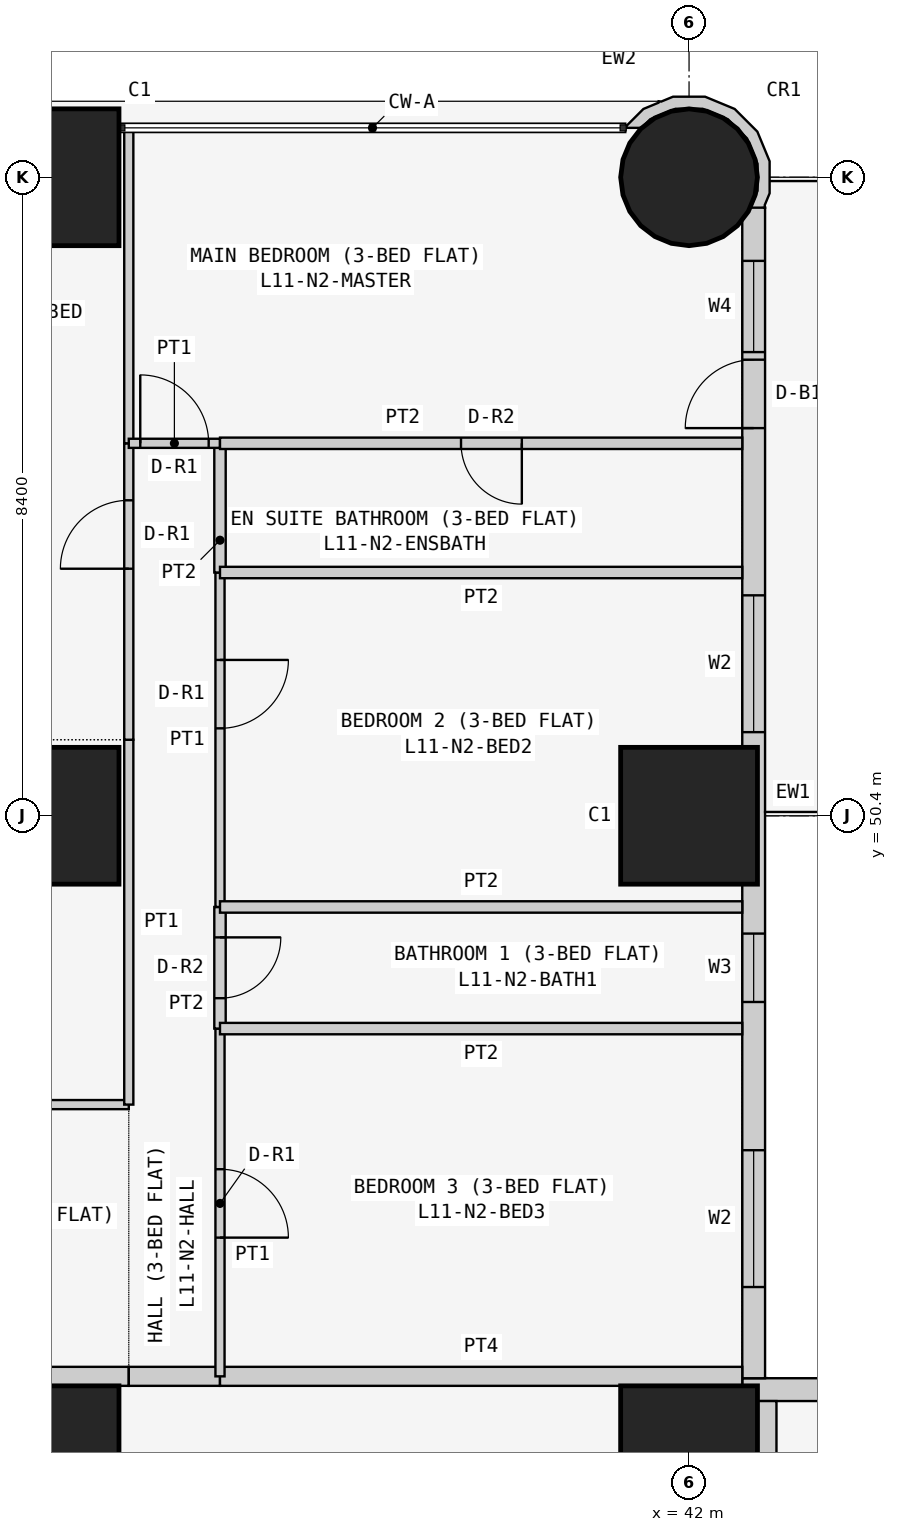
"""IFC4 building model, lengths in metres.
Left out: names, types, materials, properties, quantities, classifications, styles, units other than length and angle.
Written with IfcOpenShell. Run it as: python <this file> out.ifc"""

import sys

from ifc_helpers import new_model, si_unit, direction, frame, frame_2d, origin, origin_2d, place, context, subcontext, project, spatial, polyline, rectangle, circle, outline, extrude, element, fill, save


model = new_model("IFC4")
c1 = context("Model", 3, precision=1e-05, world=origin(), true_north=direction((0.0, 1.0)))
c2 = subcontext(c1, "Body", "Model", "MODEL_VIEW")
j1 = project(units=[si_unit("LENGTHUNIT", "METRE"), si_unit("PLANEANGLEUNIT", "RADIAN")], contexts=[c1])
p1 = place(None, origin())
s1 = spatial("IfcSite", under=j1, at=p1, CompositionType="ELEMENT")
p2 = place(p1, origin())
s2 = spatial("IfcBuilding", under=s1, at=p2, CompositionType="ELEMENT")
p3 = place(p2, frame((0.0, 0.0, 48.9)))
s3 = spatial("IfcBuildingStorey", under=s2, at=p3, CompositionType="ELEMENT", Elevation=48.9)
for number, where, z_axis, x_axis in (
    (1, (33.6, 42.0, 0.0), (0.0, 0.0, 1.0), (1.0, 0.0, 0.0)),
    (2, (33.6, 50.4, 0.0), (0.0, 0.0, 1.0), (1.0, 0.0, 0.0)),
    (3, (33.6, 58.8, 0.0), (0.0, 0.0, 1.0), (1.0, 0.0, 0.0)),
    (4, (42.0, 42.0, 0.0), (0.0, 0.0, 1.0), (1.0, 0.0, 0.0)),
    (5, (42.0, 50.4, 0.0), (0.0, 0.0, 1.0), (1.0, 0.0, 0.0)),
):
    element("IfcColumn", number, at=place(p3, frame(where, z_axis=z_axis, x_axis=x_axis)), inside=s3, PredefinedType="COLUMN", context=c2, shape_type="SweptSolid", body=[
        extrude(rectangle(XDim=1.8, YDim=1.8, at=origin_2d()), origin(), (0.0, 0.0, 1.0), 3.6),
    ])
p4 = place(p3, frame((42.0, 58.8, 0.0), z_axis=(0.0, 0.0, 1.0), x_axis=(1.0, 0.0, 0.0)))
e6 = element("IfcColumn", 6, at=p4, inside=s3, PredefinedType="COLUMN", context=c2, shape_type="SweptSolid", body=[
    extrude(circle(Radius=0.9, at=origin_2d()), origin(), (0.0, 0.0, 1.0), 3.6),
])
p5 = place(p3, frame((58.4, 42.85, 0.0), z_axis=(0.0, 0.0, 1.0), x_axis=(-1.0, 0.0, 0.0)))
e7 = element("IfcWall", 7, at=p5, inside=s3, PredefinedType="SOLIDWALL", context=c2, shape_type="SweptSolid", body=[
    extrude(rectangle(XDim=15.7, YDim=0.3, at=frame_2d((7.85, 0.0))), origin(), (0.0, 0.0, 1.0), 3.45),
])
p6 = place(p5, frame((12.4, 0.0, 0.9)))
e8 = element("IfcOpeningElement", 8, at=p6, cuts=e7, PredefinedType="OPENING", context=c2, shape_type="SweptSolid", body=[
    extrude(rectangle(XDim=1.8, YDim=1.5, at=frame_2d((0.9, 0.75))), frame((0.0, 0.16, 0.0), z_axis=(0.0, -1.0, 0.0), x_axis=(1.0, 0.0, 0.0)), (0.0, 0.0, 1.0), 0.32),
])
p7 = place(p5, frame((9.55, 0.0, 1.5)))
e9 = element("IfcOpeningElement", 9, at=p7, cuts=e7, PredefinedType="OPENING", context=c2, shape_type="SweptSolid", body=[
    extrude(rectangle(XDim=0.9, YDim=0.7, at=frame_2d((0.45, 0.35))), frame((0.0, 0.16, 0.0), z_axis=(0.0, -1.0, 0.0), x_axis=(1.0, 0.0, 0.0)), (0.0, 0.0, 1.0), 0.32),
])
p8 = place(p5, frame((5.1, 0.0, 0.9)))
e10 = element("IfcOpeningElement", 10, at=p8, cuts=e7, PredefinedType="OPENING", context=c2, shape_type="SweptSolid", body=[
    extrude(rectangle(XDim=1.8, YDim=1.5, at=frame_2d((0.9, 0.75))), frame((0.0, 0.16, 0.0), z_axis=(0.0, -1.0, 0.0), x_axis=(1.0, 0.0, 0.0)), (0.0, 0.0, 1.0), 0.32),
])
p9 = place(p5, frame((2.0, 0.0, 0.0)))
e11 = element("IfcOpeningElement", 11, at=p9, cuts=e7, PredefinedType="OPENING", context=c2, shape_type="SweptSolid", body=[
    extrude(rectangle(XDim=0.9, YDim=2.4, at=frame_2d((0.45, 1.2))), frame((0.0, 0.16, 0.0), z_axis=(0.0, -1.0, 0.0), x_axis=(1.0, 0.0, 0.0)), (0.0, 0.0, 1.0), 0.32),
])
p10 = place(p5, frame((0.7, 0.0, 0.9)))
e12 = element("IfcOpeningElement", 12, at=p10, cuts=e7, PredefinedType="OPENING", context=c2, shape_type="SweptSolid", body=[
    extrude(rectangle(XDim=1.2, YDim=1.5, at=frame_2d((0.6, 0.75))), frame((0.0, 0.16, 0.0), z_axis=(0.0, -1.0, 0.0), x_axis=(1.0, 0.0, 0.0)), (0.0, 0.0, 1.0), 0.32),
])
p11 = place(p3, frame((42.85, 43.0, 0.0), z_axis=(0.0, 0.0, 1.0), x_axis=(0.0, 1.0, 0.0)))
e13 = element("IfcWall", 13, at=p11, inside=s3, PredefinedType="SOLIDWALL", context=c2, shape_type="SweptSolid", body=[
    extrude(rectangle(XDim=15.4, YDim=0.3, at=frame_2d((7.7, 0.0))), origin(), (0.0, 0.0, 1.0), 3.45),
])
p12 = place(p11, frame((1.2, 0.0, 0.9)))
e14 = element("IfcOpeningElement", 14, at=p12, cuts=e13, PredefinedType="OPENING", context=c2, shape_type="SweptSolid", body=[
    extrude(rectangle(XDim=1.8, YDim=1.5, at=frame_2d((0.9, 0.75))), frame((0.0, 0.16, 0.0), z_axis=(0.0, -1.0, 0.0), x_axis=(1.0, 0.0, 0.0)), (0.0, 0.0, 1.0), 0.32),
])
p13 = place(p11, frame((4.95, 0.0, 1.5)))
e15 = element("IfcOpeningElement", 15, at=p13, cuts=e13, PredefinedType="OPENING", context=c2, shape_type="SweptSolid", body=[
    extrude(rectangle(XDim=0.9, YDim=0.7, at=frame_2d((0.45, 0.35))), frame((0.0, 0.16, 0.0), z_axis=(0.0, -1.0, 0.0), x_axis=(1.0, 0.0, 0.0)), (0.0, 0.0, 1.0), 0.32),
])
p14 = place(p11, frame((8.5, 0.0, 0.9)))
e16 = element("IfcOpeningElement", 16, at=p14, cuts=e13, PredefinedType="OPENING", context=c2, shape_type="SweptSolid", body=[
    extrude(rectangle(XDim=1.8, YDim=1.5, at=frame_2d((0.9, 0.75))), frame((0.0, 0.16, 0.0), z_axis=(0.0, -1.0, 0.0), x_axis=(1.0, 0.0, 0.0)), (0.0, 0.0, 1.0), 0.32),
])
p15 = place(p11, frame((12.5, 0.0, 0.0)))
e17 = element("IfcOpeningElement", 17, at=p15, cuts=e13, PredefinedType="OPENING", context=c2, shape_type="SweptSolid", body=[
    extrude(rectangle(XDim=0.9, YDim=2.4, at=frame_2d((0.45, 1.2))), frame((0.0, 0.16, 0.0), z_axis=(0.0, -1.0, 0.0), x_axis=(1.0, 0.0, 0.0)), (0.0, 0.0, 1.0), 0.32),
])
p16 = place(p11, frame((13.5, 0.0, 0.9)))
e18 = element("IfcOpeningElement", 18, at=p16, cuts=e13, PredefinedType="OPENING", context=c2, shape_type="SweptSolid", body=[
    extrude(rectangle(XDim=1.2, YDim=1.5, at=frame_2d((0.6, 0.75))), frame((0.0, 0.16, 0.0), z_axis=(0.0, -1.0, 0.0), x_axis=(1.0, 0.0, 0.0)), (0.0, 0.0, 1.0), 0.32),
])
p17 = place(p3, frame((42.91, 58.436, 0.0), z_axis=(0.0, 0.0, 1.0), x_axis=(0.377204953059, 0.926129809145, 0.0)))
e19 = element("IfcWall", 19, at=p17, inside=s3, PredefinedType="SOLIDWALL", context=c2, shape_type="SweptSolid", body=[
    extrude(outline(polyline([(0.769, 1.728), (0.75, 1.723), (0.6, 1.875), (0.295, 2.004), (0.281, 1.998), (0.36, 1.803), (0.509, 1.741), (0.761, 1.486), (0.896, 1.154), (0.894, 0.795), (0.755, 0.465), (0.5, 0.213), (0.168, 0.078), (-0.1, 0.08), (0.001, -0.097), (0.03, -0.08), (0.198, -0.081), (0.589, 0.078), (0.889, 0.374), (1.052, 0.763), (1.055, 1.185), (0.896, 1.575), (0.778, 1.695), (0.769, 1.728)])), origin(), (0.0, 0.0, 1.0), 3.45),
])
p18 = place(p3, frame((29.4, 43.025, 0.0), z_axis=(0.0, 0.0, 1.0), x_axis=(1.0, 0.0, 0.0)))
e20 = element("IfcWall", 20, at=p18, inside=s3, PredefinedType="PARTITIONING", context=c2, shape_type="SweptSolid", body=[
    extrude(rectangle(XDim=5.229, YDim=0.25, at=frame_2d((2.615, 0.0))), origin(), (0.0, 0.0, 1.0), 3.45),
])
p19 = place(p18, frame((2.1, 0.0, 0.0)))
e21 = element("IfcOpeningElement", 21, at=p19, cuts=e20, PredefinedType="OPENING", context=c2, shape_type="SweptSolid", body=[
    extrude(rectangle(XDim=1.0, YDim=2.1, at=frame_2d((0.5, 1.05))), frame((0.0, 0.135, 0.0), z_axis=(0.0, -1.0, 0.0), x_axis=(1.0, 0.0, 0.0)), (0.0, 0.0, 1.0), 0.27),
])
p20 = place(p3, frame((34.629, 43.025, 0.0), z_axis=(0.0, 0.0, 1.0), x_axis=(1.0, 0.0, 0.0)))
e22 = element("IfcWall", 22, at=p20, inside=s3, PredefinedType="PARTITIONING", context=c2, shape_type="SweptSolid", body=[
    extrude(rectangle(XDim=1.2, YDim=0.25, at=frame_2d((0.6, 0.0))), origin(), (0.0, 0.0, 1.0), 3.45),
])
for number, where, z_axis, x_axis in (
    (23, (35.829, 43.025, 0.0), (0.0, 0.0, 1.0), (1.0, 0.0, 0.0)),
    (24, (43.025, 42.7, 0.0), (0.0, 0.0, 1.0), (0.0, -1.0, 0.0)),
):
    element("IfcWall", number, at=place(p3, frame(where, z_axis=z_axis, x_axis=x_axis)), inside=s3, PredefinedType="PARTITIONING", context=c2, shape_type="SweptSolid", body=[
        extrude(rectangle(XDim=6.871, YDim=0.25, at=frame_2d((3.436, 0.0))), origin(), (0.0, 0.0, 1.0), 3.45),
    ])
p21 = place(p3, frame((29.4, 46.6, 0.0), z_axis=(0.0, 0.0, 1.0), x_axis=(1.0, 0.0, 0.0)))
e25 = element("IfcWall", 25, at=p21, inside=s3, PredefinedType="PARTITIONING", context=c2, shape_type="SweptSolid", body=[
    extrude(rectangle(XDim=5.229, YDim=0.12, at=frame_2d((2.615, 0.0))), origin(), (0.0, 0.0, 1.0), 3.45),
])
p22 = place(p21, frame((1.05, 0.0, 0.0)))
e26 = element("IfcOpeningElement", 26, at=p22, cuts=e25, PredefinedType="OPENING", context=c2, shape_type="SweptSolid", body=[
    extrude(rectangle(XDim=0.9, YDim=2.1, at=frame_2d((0.45, 1.05))), frame((0.0, 0.07, 0.0), z_axis=(0.0, -1.0, 0.0), x_axis=(1.0, 0.0, 0.0)), (0.0, 0.0, 1.0), 0.14),
])
p23 = place(p3, frame((34.629, 51.4, 0.0), z_axis=(0.0, 0.0, 1.0), x_axis=(0.0, -1.0, 0.0)))
e27 = element("IfcWall", 27, at=p23, inside=s3, PredefinedType="PARTITIONING", context=c2, shape_type="SweptSolid", body=[
    extrude(rectangle(XDim=4.8, YDim=0.12, at=frame_2d((2.4, 0.0))), origin(), (0.0, 0.0, 1.0), 3.45),
])
p24 = place(p3, frame((34.629, 55.3, 0.0), z_axis=(0.0, 0.0, 1.0), x_axis=(0.0, -1.0, 0.0)))
e28 = element("IfcWall", 28, at=p24, inside=s3, PredefinedType="PARTITIONING", context=c2, shape_type="SweptSolid", body=[
    extrude(rectangle(XDim=3.9, YDim=0.12, at=frame_2d((1.95, 0.0))), origin(), (0.0, 0.0, 1.0), 3.45),
])
p25 = place(p24, frame((0.75, 0.0, 0.0)))
e29 = element("IfcOpeningElement", 29, at=p25, cuts=e28, PredefinedType="OPENING", context=c2, shape_type="SweptSolid", body=[
    extrude(rectangle(XDim=0.9, YDim=2.1, at=frame_2d((0.45, 1.05))), frame((0.0, 0.07, 0.0), z_axis=(0.0, -1.0, 0.0), x_axis=(1.0, 0.0, 0.0)), (0.0, 0.0, 1.0), 0.14),
])
p26 = place(p3, frame((34.629, 59.45, 0.0), z_axis=(0.0, 0.0, 1.0), x_axis=(0.0, -1.0, 0.0)))
e30 = element("IfcWall", 30, at=p26, inside=s3, PredefinedType="PARTITIONING", context=c2, shape_type="SweptSolid", body=[
    extrude(rectangle(XDim=4.15, YDim=0.12, at=frame_2d((2.075, 0.0))), origin(), (0.0, 0.0, 1.0), 3.45),
])
p27 = place(p3, frame((35.829, 47.6, 0.0), z_axis=(0.0, 0.0, 1.0), x_axis=(0.0, -1.0, 0.0)))
e31 = element("IfcWall", 31, at=p27, inside=s3, PredefinedType="PARTITIONING", context=c2, shape_type="SweptSolid", body=[
    extrude(rectangle(XDim=4.575, YDim=0.12, at=frame_2d((2.288, 0.0))), origin(), (0.0, 0.0, 1.0), 3.45),
])
p28 = place(p27, frame((1.85, 0.0, 0.0)))
e32 = element("IfcOpeningElement", 32, at=p28, cuts=e31, PredefinedType="OPENING", context=c2, shape_type="SweptSolid", body=[
    extrude(rectangle(XDim=0.9, YDim=2.1, at=frame_2d((0.45, 1.05))), frame((0.0, 0.07, 0.0), z_axis=(0.0, -1.0, 0.0), x_axis=(1.0, 0.0, 0.0)), (0.0, 0.0, 1.0), 0.14),
])
p29 = place(p3, frame((35.829, 49.2, 0.0), z_axis=(0.0, 0.0, 1.0), x_axis=(0.0, -1.0, 0.0)))
e33 = element("IfcWall", 33, at=p29, inside=s3, PredefinedType="PARTITIONING", context=c2, shape_type="SweptSolid", body=[
    extrude(rectangle(XDim=1.6, YDim=0.15, at=frame_2d((0.8, 0.0))), origin(), (0.0, 0.0, 1.0), 3.45),
])
p30 = place(p29, frame((0.4, 0.0, 0.0)))
e34 = element("IfcOpeningElement", 34, at=p30, cuts=e33, PredefinedType="OPENING", context=c2, shape_type="SweptSolid", body=[
    extrude(rectangle(XDim=0.8, YDim=2.1, at=frame_2d((0.4, 1.05))), frame((0.0, 0.085, 0.0), z_axis=(0.0, -1.0, 0.0), x_axis=(1.0, 0.0, 0.0)), (0.0, 0.0, 1.0), 0.17),
])
p31 = place(p3, frame((35.829, 53.6, 0.0), z_axis=(0.0, 0.0, 1.0), x_axis=(0.0, -1.0, 0.0)))
e35 = element("IfcWall", 35, at=p31, inside=s3, PredefinedType="PARTITIONING", context=c2, shape_type="SweptSolid", body=[
    extrude(rectangle(XDim=4.4, YDim=0.12, at=frame_2d((2.2, 0.0))), origin(), (0.0, 0.0, 1.0), 3.45),
])
p32 = place(p31, frame((1.15, 0.0, 0.0)))
e36 = element("IfcOpeningElement", 36, at=p32, cuts=e35, PredefinedType="OPENING", context=c2, shape_type="SweptSolid", body=[
    extrude(rectangle(XDim=0.9, YDim=2.1, at=frame_2d((0.45, 1.05))), frame((0.0, 0.07, 0.0), z_axis=(0.0, -1.0, 0.0), x_axis=(1.0, 0.0, 0.0)), (0.0, 0.0, 1.0), 0.14),
])
p33 = place(p3, frame((35.829, 55.3, 0.0), z_axis=(0.0, 0.0, 1.0), x_axis=(0.0, -1.0, 0.0)))
e37 = element("IfcWall", 37, at=p33, inside=s3, PredefinedType="PARTITIONING", context=c2, shape_type="SweptSolid", body=[
    extrude(rectangle(XDim=1.7, YDim=0.15, at=frame_2d((0.85, 0.0))), origin(), (0.0, 0.0, 1.0), 3.45),
])
p34 = place(p3, frame((34.629, 55.3, 0.0), z_axis=(0.0, 0.0, 1.0), x_axis=(1.0, 0.0, 0.0)))
e38 = element("IfcWall", 38, at=p34, inside=s3, PredefinedType="PARTITIONING", context=c2, shape_type="SweptSolid", body=[
    extrude(rectangle(XDim=1.2, YDim=0.12, at=frame_2d((0.6, 0.0))), origin(), (0.0, 0.0, 1.0), 3.45),
])
p35 = place(p34, frame((0.151, 0.0, 0.0)))
e39 = element("IfcOpeningElement", 39, at=p35, cuts=e38, PredefinedType="OPENING", context=c2, shape_type="SweptSolid", body=[
    extrude(rectangle(XDim=0.9, YDim=2.1, at=frame_2d((0.45, 1.05))), frame((0.0, 0.07, 0.0), z_axis=(0.0, -1.0, 0.0), x_axis=(1.0, 0.0, 0.0)), (0.0, 0.0, 1.0), 0.14),
])
for number, where, z_axis, x_axis in (
    (40, (35.829, 47.6, 0.0), (0.0, 0.0, 1.0), (1.0, 0.0, 0.0)),
    (41, (35.829, 49.2, 0.0), (0.0, 0.0, 1.0), (1.0, 0.0, 0.0)),
    (42, (35.829, 53.6, 0.0), (0.0, 0.0, 1.0), (1.0, 0.0, 0.0)),
):
    element("IfcWall", number, at=place(p3, frame(where, z_axis=z_axis, x_axis=x_axis)), inside=s3, PredefinedType="PARTITIONING", context=c2, shape_type="SweptSolid", body=[
        extrude(rectangle(XDim=6.871, YDim=0.15, at=frame_2d((3.436, 0.0))), origin(), (0.0, 0.0, 1.0), 3.45),
    ])
p36 = place(p3, frame((35.829, 55.3, 0.0), z_axis=(0.0, 0.0, 1.0), x_axis=(1.0, 0.0, 0.0)))
e43 = element("IfcWall", 43, at=p36, inside=s3, PredefinedType="PARTITIONING", context=c2, shape_type="SweptSolid", body=[
    extrude(rectangle(XDim=6.871, YDim=0.15, at=frame_2d((3.436, 0.0))), origin(), (0.0, 0.0, 1.0), 3.45),
])
p37 = place(p36, frame((3.171, 0.0, 0.0)))
e44 = element("IfcOpeningElement", 44, at=p37, cuts=e43, PredefinedType="OPENING", context=c2, shape_type="SweptSolid", body=[
    extrude(rectangle(XDim=0.8, YDim=2.1, at=frame_2d((0.4, 1.05))), frame((0.0, 0.085, 0.0), z_axis=(0.0, -1.0, 0.0), x_axis=(1.0, 0.0, 0.0)), (0.0, 0.0, 1.0), 0.17),
])
p38 = place(p12, origin())
e45 = element("IfcWindow", 45, at=p38, inside=s3, PartitioningType="SINGLE_PANEL", PredefinedType="WINDOW", context=c2, shape_type="SweptSolid", body=[
    extrude(rectangle(XDim=1.8, YDim=1.5, at=frame_2d((0.9, 0.75))), frame((0.0, 0.03, 0.0), z_axis=(0.0, -1.0, 0.0), x_axis=(1.0, 0.0, 0.0)), (0.0, 0.0, 1.0), 0.06),
])
fill(e14, e45)
p39 = place(p13, origin())
e46 = element("IfcWindow", 46, at=p39, inside=s3, PartitioningType="SINGLE_PANEL", PredefinedType="WINDOW", context=c2, shape_type="SweptSolid", body=[
    extrude(rectangle(XDim=0.9, YDim=0.7, at=frame_2d((0.45, 0.35))), frame((0.0, 0.03, 0.0), z_axis=(0.0, -1.0, 0.0), x_axis=(1.0, 0.0, 0.0)), (0.0, 0.0, 1.0), 0.06),
])
fill(e15, e46)
p40 = place(p14, origin())
e47 = element("IfcWindow", 47, at=p40, inside=s3, PartitioningType="SINGLE_PANEL", PredefinedType="WINDOW", context=c2, shape_type="SweptSolid", body=[
    extrude(rectangle(XDim=1.8, YDim=1.5, at=frame_2d((0.9, 0.75))), frame((0.0, 0.03, 0.0), z_axis=(0.0, -1.0, 0.0), x_axis=(1.0, 0.0, 0.0)), (0.0, 0.0, 1.0), 0.06),
])
fill(e16, e47)
p41 = place(p15, origin())
e48 = element("IfcDoor", 48, at=p41, inside=s3, OperationType="SINGLE_SWING_LEFT", PredefinedType="DOOR", context=c2, shape_type="SweptSolid", body=[
    extrude(rectangle(XDim=0.9, YDim=2.4, at=frame_2d((0.45, 1.2))), frame((0.0, 0.025, 0.0), z_axis=(0.0, -1.0, 0.0), x_axis=(1.0, 0.0, 0.0)), (0.0, 0.0, 1.0), 0.05),
])
fill(e17, e48)
p42 = place(p16, origin())
e49 = element("IfcWindow", 49, at=p42, inside=s3, PartitioningType="SINGLE_PANEL", PredefinedType="WINDOW", context=c2, shape_type="SweptSolid", body=[
    extrude(rectangle(XDim=1.2, YDim=1.5, at=frame_2d((0.6, 0.75))), frame((0.0, 0.03, 0.0), z_axis=(0.0, -1.0, 0.0), x_axis=(1.0, 0.0, 0.0)), (0.0, 0.0, 1.0), 0.06),
])
fill(e18, e49)
p43 = place(p25, frame((0.9, 0.0, 0.0), z_axis=(0.0, 0.0, 1.0), x_axis=(-1.0, 0.0, 0.0)))
e50 = element("IfcDoor", 50, at=p43, inside=s3, OperationType="SINGLE_SWING_LEFT", PredefinedType="DOOR", context=c2, shape_type="SweptSolid", body=[
    extrude(rectangle(XDim=0.9, YDim=2.1, at=frame_2d((0.45, 1.05))), frame((0.0, 0.025, 0.0), z_axis=(0.0, -1.0, 0.0), x_axis=(1.0, 0.0, 0.0)), (0.0, 0.0, 1.0), 0.05),
])
fill(e29, e50)
p44 = place(p28, origin())
e51 = element("IfcDoor", 51, at=p44, inside=s3, OperationType="SINGLE_SWING_RIGHT", PredefinedType="DOOR", context=c2, shape_type="SweptSolid", body=[
    extrude(rectangle(XDim=0.9, YDim=2.1, at=frame_2d((0.45, 1.05))), frame((0.0, 0.025, 0.0), z_axis=(0.0, -1.0, 0.0), x_axis=(1.0, 0.0, 0.0)), (0.0, 0.0, 1.0), 0.05),
])
fill(e32, e51)
p45 = place(p30, origin())
e52 = element("IfcDoor", 52, at=p45, inside=s3, OperationType="SINGLE_SWING_LEFT", PredefinedType="DOOR", context=c2, shape_type="SweptSolid", body=[
    extrude(rectangle(XDim=0.8, YDim=2.1, at=frame_2d((0.4, 1.05))), frame((0.0, 0.025, 0.0), z_axis=(0.0, -1.0, 0.0), x_axis=(1.0, 0.0, 0.0)), (0.0, 0.0, 1.0), 0.05),
])
fill(e34, e52)
p46 = place(p32, origin())
e53 = element("IfcDoor", 53, at=p46, inside=s3, OperationType="SINGLE_SWING_LEFT", PredefinedType="DOOR", context=c2, shape_type="SweptSolid", body=[
    extrude(rectangle(XDim=0.9, YDim=2.1, at=frame_2d((0.45, 1.05))), frame((0.0, 0.025, 0.0), z_axis=(0.0, -1.0, 0.0), x_axis=(1.0, 0.0, 0.0)), (0.0, 0.0, 1.0), 0.05),
])
fill(e36, e53)
p47 = place(p35, origin())
e54 = element("IfcDoor", 54, at=p47, inside=s3, OperationType="SINGLE_SWING_LEFT", PredefinedType="DOOR", context=c2, shape_type="SweptSolid", body=[
    extrude(rectangle(XDim=0.9, YDim=2.1, at=frame_2d((0.45, 1.05))), frame((0.0, 0.025, 0.0), z_axis=(0.0, -1.0, 0.0), x_axis=(1.0, 0.0, 0.0)), (0.0, 0.0, 1.0), 0.05),
])
fill(e39, e54)
p48 = place(p37, frame((0.8, 0.0, 0.0), z_axis=(0.0, 0.0, 1.0), x_axis=(-1.0, 0.0, 0.0)))
e55 = element("IfcDoor", 55, at=p48, inside=s3, OperationType="SINGLE_SWING_LEFT", PredefinedType="DOOR", context=c2, shape_type="SweptSolid", body=[
    extrude(rectangle(XDim=0.8, YDim=2.1, at=frame_2d((0.4, 1.05))), frame((0.0, 0.025, 0.0), z_axis=(0.0, -1.0, 0.0), x_axis=(1.0, 0.0, 0.0)), (0.0, 0.0, 1.0), 0.05),
])
fill(e44, e55)
save(model, sys.argv[1])
